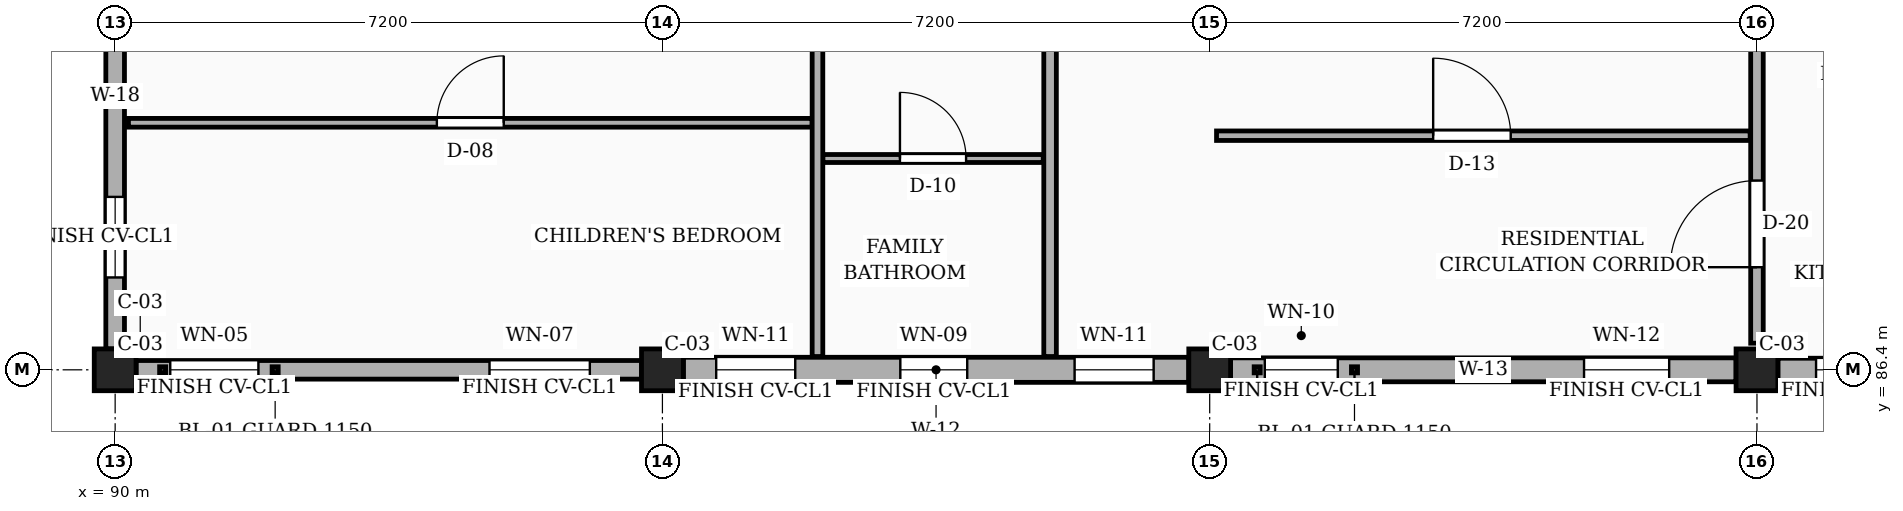
"""IFC4 building model, lengths in metres.
Left out: names, types, materials, properties, quantities, classifications, styles, units other than length and angle.
Written with IfcOpenShell. Run it as: python <this file> out.ifc"""

import sys

from ifc_helpers import new_model, si_unit, direction, frame, frame_2d, origin, origin_2d, place, context, subcontext, project, spatial, rectangle, extrude, element, fill, save


model = new_model("IFC4")
c1 = context("Model", 3, precision=1e-05, world=origin(), true_north=direction((0.0, 1.0)))
c2 = subcontext(c1, "Body", "Model", "MODEL_VIEW")
j1 = project(units=[si_unit("LENGTHUNIT", "METRE"), si_unit("PLANEANGLEUNIT", "RADIAN")], contexts=[c1])
p1 = place(None, origin())
s1 = spatial("IfcSite", under=j1, at=p1, CompositionType="ELEMENT")
p2 = place(p1, origin())
s2 = spatial("IfcBuilding", under=s1, at=p2, CompositionType="ELEMENT")
p3 = place(p2, frame((0.0, 0.0, 20.25)))
s3 = spatial("IfcBuildingStorey", under=s2, at=p3, CompositionType="ELEMENT", Elevation=20.25)
for number, where, z_axis, x_axis in (
    (1, (90.0, 86.4, 0.0), (0.0, 0.0, 1.0), (1.0, 0.0, 0.0)),
    (2, (97.2, 86.4, 0.0), (0.0, 0.0, 1.0), (1.0, 0.0, 0.0)),
    (3, (104.4, 86.4, 0.0), (0.0, 0.0, 1.0), (1.0, 0.0, 0.0)),
    (4, (111.6, 86.4, 0.0), (0.0, 0.0, 1.0), (1.0, 0.0, 0.0)),
):
    element("IfcColumn", number, at=place(p3, frame(where, z_axis=z_axis, x_axis=x_axis)), inside=s3, PredefinedType="COLUMN", context=c2, shape_type="SweptSolid", body=[
        extrude(rectangle(XDim=0.55, YDim=0.55, at=origin_2d()), origin(), (0.0, 0.0, 1.0), 3.15),
    ])
p4 = place(p3, frame((90.275, 86.4, 0.0), z_axis=(0.0, 0.0, 1.0), x_axis=(1.0, 0.0, 0.0)))
e5 = element("IfcWall", 5, at=p4, inside=s3, PredefinedType="SOLIDWALL", context=c2, shape_type="SweptSolid", body=[
    extrude(rectangle(XDim=6.65, YDim=0.245, at=frame_2d((3.325, 0.0))), origin(), (0.0, 0.0, 1.0), 2.46),
])
p5 = place(p4, frame((0.45, 0.0, 0.78)))
e6 = element("IfcOpeningElement", 6, at=p5, cuts=e5, PredefinedType="OPENING", context=c2, shape_type="SweptSolid", body=[
    extrude(rectangle(XDim=1.16, YDim=1.15, at=frame_2d((0.58, 0.575))), frame((0.0, 0.133, 0.0), z_axis=(0.0, -1.0, 0.0), x_axis=(1.0, 0.0, 0.0)), (0.0, 0.0, 1.0), 0.265),
])
p6 = place(p4, frame((4.65, 0.0, 0.78)))
e7 = element("IfcOpeningElement", 7, at=p6, cuts=e5, PredefinedType="OPENING", context=c2, shape_type="SweptSolid", body=[
    extrude(rectangle(XDim=1.32, YDim=1.15, at=frame_2d((0.66, 0.575))), frame((0.0, 0.133, 0.0), z_axis=(0.0, -1.0, 0.0), x_axis=(1.0, 0.0, 0.0)), (0.0, 0.0, 1.0), 0.265),
])
p7 = place(p3, frame((97.475, 86.4, 0.0), z_axis=(0.0, 0.0, 1.0), x_axis=(1.0, 0.0, 0.0)))
e8 = element("IfcWall", 8, at=p7, inside=s3, PredefinedType="SOLIDWALL", context=c2, shape_type="SweptSolid", body=[
    extrude(rectangle(XDim=6.65, YDim=0.33, at=frame_2d((3.325, 0.0))), origin(), (0.0, 0.0, 1.0), 2.46),
])
p8 = place(p7, frame((0.433, 0.0, 0.78)))
e9 = element("IfcOpeningElement", 9, at=p8, cuts=e8, PredefinedType="OPENING", context=c2, shape_type="SweptSolid", body=[
    extrude(rectangle(XDim=1.04, YDim=1.26, at=frame_2d((0.52, 0.63))), frame((0.0, 0.175, 0.0), z_axis=(0.0, -1.0, 0.0), x_axis=(1.0, 0.0, 0.0)), (0.0, 0.0, 1.0), 0.35),
])
p9 = place(p7, frame((2.855, 0.0, 0.78)))
e10 = element("IfcOpeningElement", 10, at=p9, cuts=e8, PredefinedType="OPENING", context=c2, shape_type="SweptSolid", body=[
    extrude(rectangle(XDim=0.88, YDim=1.26, at=frame_2d((0.44, 0.63))), frame((0.0, 0.175, 0.0), z_axis=(0.0, -1.0, 0.0), x_axis=(1.0, 0.0, 0.0)), (0.0, 0.0, 1.0), 0.35),
])
p10 = place(p7, frame((5.147, 0.0, 0.78)))
e11 = element("IfcOpeningElement", 11, at=p10, cuts=e8, PredefinedType="OPENING", context=c2, shape_type="SweptSolid", body=[
    extrude(rectangle(XDim=1.04, YDim=1.26, at=frame_2d((0.52, 0.63))), frame((0.0, 0.175, 0.0), z_axis=(0.0, -1.0, 0.0), x_axis=(1.0, 0.0, 0.0)), (0.0, 0.0, 1.0), 0.35),
])
p11 = place(p3, frame((104.675, 86.4, 0.0), z_axis=(0.0, 0.0, 1.0), x_axis=(1.0, 0.0, 0.0)))
e12 = element("IfcWall", 12, at=p11, inside=s3, PredefinedType="SOLIDWALL", context=c2, shape_type="SweptSolid", body=[
    extrude(rectangle(XDim=6.65, YDim=0.315, at=frame_2d((3.325, 0.0))), origin(), (0.0, 0.0, 1.0), 2.46),
])
p12 = place(p11, frame((0.45, 0.0, 0.78)))
e13 = element("IfcOpeningElement", 13, at=p12, cuts=e12, PredefinedType="OPENING", context=c2, shape_type="SweptSolid", body=[
    extrude(rectangle(XDim=0.96, YDim=1.26, at=frame_2d((0.48, 0.63))), frame((0.0, 0.167, 0.0), z_axis=(0.0, -1.0, 0.0), x_axis=(1.0, 0.0, 0.0)), (0.0, 0.0, 1.0), 0.335),
])
p13 = place(p11, frame((4.65, 0.0, 0.78)))
e14 = element("IfcOpeningElement", 14, at=p13, cuts=e12, PredefinedType="OPENING", context=c2, shape_type="SweptSolid", body=[
    extrude(rectangle(XDim=1.12, YDim=1.26, at=frame_2d((0.56, 0.63))), frame((0.0, 0.167, 0.0), z_axis=(0.0, -1.0, 0.0), x_axis=(1.0, 0.0, 0.0)), (0.0, 0.0, 1.0), 0.335),
])
p14 = place(p3, frame((111.875, 86.4, 0.0), z_axis=(0.0, 0.0, 1.0), x_axis=(1.0, 0.0, 0.0)))
e15 = element("IfcWall", 15, at=p14, inside=s3, PredefinedType="SOLIDWALL", context=c2, shape_type="SweptSolid", body=[
    extrude(rectangle(XDim=6.65, YDim=0.305, at=frame_2d((3.325, 0.0))), origin(), (0.0, 0.0, 1.0), 2.46),
])
p15 = place(p14, frame((0.502, 0.0, 0.78)))
e16 = element("IfcOpeningElement", 16, at=p15, cuts=e15, PredefinedType="OPENING", context=c2, shape_type="SweptSolid", body=[
    extrude(rectangle(XDim=1.12, YDim=1.26, at=frame_2d((0.56, 0.63))), frame((0.0, 0.163, 0.0), z_axis=(0.0, -1.0, 0.0), x_axis=(1.0, 0.0, 0.0)), (0.0, 0.0, 1.0), 0.325),
])
p16 = place(p14, frame((3.607, 0.0, 0.78)))
e17 = element("IfcOpeningElement", 17, at=p16, cuts=e15, PredefinedType="OPENING", context=c2, shape_type="SweptSolid", body=[
    extrude(rectangle(XDim=1.28, YDim=1.26, at=frame_2d((0.64, 0.63))), frame((0.0, 0.163, 0.0), z_axis=(0.0, -1.0, 0.0), x_axis=(1.0, 0.0, 0.0)), (0.0, 0.0, 1.0), 0.325),
])
p17 = place(p3, frame((90.0, 93.325, 0.0), z_axis=(0.0, 0.0, 1.0), x_axis=(0.0, -1.0, 0.0)))
e18 = element("IfcWall", 18, at=p17, inside=s3, PredefinedType="SOLIDWALL", context=c2, shape_type="SweptSolid", body=[
    extrude(rectangle(XDim=6.65, YDim=0.245, at=frame_2d((3.325, 0.0))), origin(), (0.0, 0.0, 1.0), 2.46),
])
p18 = place(p17, frame((0.45, 0.0, 0.78)))
e19 = element("IfcOpeningElement", 19, at=p18, cuts=e18, PredefinedType="OPENING", context=c2, shape_type="SweptSolid", body=[
    extrude(rectangle(XDim=0.9, YDim=1.36, at=frame_2d((0.45, 0.68))), frame((0.0, 0.133, 0.0), z_axis=(0.0, -1.0, 0.0), x_axis=(1.0, 0.0, 0.0)), (0.0, 0.0, 1.0), 0.265),
])
p19 = place(p17, frame((4.65, 0.0, 0.78)))
e20 = element("IfcOpeningElement", 20, at=p19, cuts=e18, PredefinedType="OPENING", context=c2, shape_type="SweptSolid", body=[
    extrude(rectangle(XDim=1.06, YDim=1.36, at=frame_2d((0.53, 0.68))), frame((0.0, 0.133, 0.0), z_axis=(0.0, -1.0, 0.0), x_axis=(1.0, 0.0, 0.0)), (0.0, 0.0, 1.0), 0.265),
])
p20 = place(p3, frame((102.3, 86.575, 0.0), z_axis=(0.0, 0.0, 1.0), x_axis=(0.0, 1.0, 0.0)))
e21 = element("IfcWall", 21, at=p20, inside=s3, PredefinedType="PARTITIONING", context=c2, shape_type="SweptSolid", body=[
    extrude(rectangle(XDim=7.005, YDim=0.165, at=frame_2d((3.502, 0.0))), origin(), (0.0, 0.0, 1.0), 2.325),
])
p21 = place(p20, frame((4.625, 0.0, 0.0)))
e22 = element("IfcOpeningElement", 22, at=p21, cuts=e21, PredefinedType="OPENING", context=c2, shape_type="SweptSolid", body=[
    extrude(rectangle(XDim=0.94, YDim=2.12, at=frame_2d((0.47, 1.06))), frame((0.0, 0.093, 0.0), z_axis=(0.0, -1.0, 0.0), x_axis=(1.0, 0.0, 0.0)), (0.0, 0.0, 1.0), 0.185),
])
p22 = place(p3, frame((111.6, 86.75, 0.0), z_axis=(0.0, 0.0, 1.0), x_axis=(0.0, 1.0, 0.0)))
e23 = element("IfcWall", 23, at=p22, inside=s3, PredefinedType="PARTITIONING", context=c2, shape_type="SweptSolid", body=[
    extrude(rectangle(XDim=6.5, YDim=0.165, at=frame_2d((3.25, 0.0))), origin(), (0.0, 0.0, 1.0), 2.325),
])
p23 = place(p22, frame((1.0, 0.0, 0.0)))
e24 = element("IfcOpeningElement", 24, at=p23, cuts=e23, PredefinedType="OPENING", context=c2, shape_type="SweptSolid", body=[
    extrude(rectangle(XDim=1.14, YDim=2.18, at=frame_2d((0.57, 1.09))), frame((0.0, 0.093, 0.0), z_axis=(0.0, -1.0, 0.0), x_axis=(1.0, 0.0, 0.0)), (0.0, 0.0, 1.0), 0.185),
])
p24 = place(p3, frame((104.49, 89.48, 0.0), z_axis=(0.0, 0.0, 1.0), x_axis=(1.0, 0.0, 0.0)))
e25 = element("IfcWall", 25, at=p24, inside=s3, PredefinedType="PARTITIONING", context=c2, shape_type="SweptSolid", body=[
    extrude(rectangle(XDim=7.02, YDim=0.125, at=frame_2d((3.51, 0.0))), origin(), (0.0, 0.0, 1.0), 2.325),
])
p25 = place(p24, frame((2.85, 0.0, 0.0)))
e26 = element("IfcOpeningElement", 26, at=p25, cuts=e25, PredefinedType="OPENING", context=c2, shape_type="SweptSolid", body=[
    extrude(rectangle(XDim=1.02, YDim=2.15, at=frame_2d((0.51, 1.075))), frame((0.0, 0.073, 0.0), z_axis=(0.0, -1.0, 0.0), x_axis=(1.0, 0.0, 0.0)), (0.0, 0.0, 1.0), 0.145),
])
p26 = place(p3, frame((90.175, 89.65, 0.0), z_axis=(0.0, 0.0, 1.0), x_axis=(1.0, 0.0, 0.0)))
e27 = element("IfcWall", 27, at=p26, inside=s3, PredefinedType="PARTITIONING", context=c2, shape_type="SweptSolid", body=[
    extrude(rectangle(XDim=8.995, YDim=0.115, at=frame_2d((4.498, 0.0))), origin(), (0.0, 0.0, 1.0), 2.325),
])
p27 = place(p26, frame((4.058, 0.0, 0.0)))
e28 = element("IfcOpeningElement", 28, at=p27, cuts=e27, PredefinedType="OPENING", context=c2, shape_type="SweptSolid", body=[
    extrude(rectangle(XDim=0.88, YDim=2.08, at=frame_2d((0.44, 1.04))), frame((0.0, 0.067, 0.0), z_axis=(0.0, -1.0, 0.0), x_axis=(1.0, 0.0, 0.0)), (0.0, 0.0, 1.0), 0.135),
])
p28 = place(p3, frame((99.31, 89.18, 0.0), z_axis=(0.0, 0.0, 1.0), x_axis=(1.0, 0.0, 0.0)))
e29 = element("IfcWall", 29, at=p28, inside=s3, PredefinedType="PARTITIONING", context=c2, shape_type="SweptSolid", body=[
    extrude(rectangle(XDim=2.9, YDim=0.105, at=frame_2d((1.45, 0.0))), origin(), (0.0, 0.0, 1.0), 2.325),
])
p29 = place(p28, frame((1.015, 0.0, 0.0)))
e30 = element("IfcOpeningElement", 30, at=p29, cuts=e29, PredefinedType="OPENING", context=c2, shape_type="SweptSolid", body=[
    extrude(rectangle(XDim=0.87, YDim=2.05, at=frame_2d((0.435, 1.025))), frame((0.0, 0.062, 0.0), z_axis=(0.0, -1.0, 0.0), x_axis=(1.0, 0.0, 0.0)), (0.0, 0.0, 1.0), 0.125),
])
p30 = place(p3, frame((99.24, 86.575, 0.0), z_axis=(0.0, 0.0, 1.0), x_axis=(0.0, 1.0, 0.0)))
e31 = element("IfcWall", 31, at=p30, inside=s3, PredefinedType="PARTITIONING", context=c2, shape_type="SweptSolid", body=[
    extrude(rectangle(XDim=6.885, YDim=0.14, at=frame_2d((3.442, 0.0))), origin(), (0.0, 0.0, 1.0), 2.325),
])
p31 = place(p30, frame((4.625, 0.0, 0.0)))
e32 = element("IfcOpeningElement", 32, at=p31, cuts=e31, PredefinedType="OPENING", context=c2, shape_type="SweptSolid", body=[
    extrude(rectangle(XDim=0.92, YDim=2.1, at=frame_2d((0.46, 1.05))), frame((0.0, 0.08, 0.0), z_axis=(0.0, -1.0, 0.0), x_axis=(1.0, 0.0, 0.0)), (0.0, 0.0, 1.0), 0.16),
])
p32 = place(p5, origin())
e33 = element("IfcWindow", 33, at=p32, inside=s3, PartitioningType="SINGLE_PANEL", PredefinedType="WINDOW", context=c2, shape_type="SweptSolid", body=[
    extrude(rectangle(XDim=1.16, YDim=1.15, at=frame_2d((0.58, 0.575))), frame((0.0, 0.03, 0.0), z_axis=(0.0, -1.0, 0.0), x_axis=(1.0, 0.0, 0.0)), (0.0, 0.0, 1.0), 0.06),
])
fill(e6, e33)
p33 = place(p6, origin())
e34 = element("IfcWindow", 34, at=p33, inside=s3, PartitioningType="SINGLE_PANEL", PredefinedType="WINDOW", context=c2, shape_type="SweptSolid", body=[
    extrude(rectangle(XDim=1.32, YDim=1.15, at=frame_2d((0.66, 0.575))), frame((0.0, 0.03, 0.0), z_axis=(0.0, -1.0, 0.0), x_axis=(1.0, 0.0, 0.0)), (0.0, 0.0, 1.0), 0.06),
])
fill(e7, e34)
p34 = place(p8, origin())
e35 = element("IfcWindow", 35, at=p34, inside=s3, PartitioningType="SINGLE_PANEL", PredefinedType="WINDOW", context=c2, shape_type="SweptSolid", body=[
    extrude(rectangle(XDim=1.04, YDim=1.26, at=frame_2d((0.52, 0.63))), frame((0.0, 0.03, 0.0), z_axis=(0.0, -1.0, 0.0), x_axis=(1.0, 0.0, 0.0)), (0.0, 0.0, 1.0), 0.06),
])
fill(e9, e35)
p35 = place(p9, origin())
e36 = element("IfcWindow", 36, at=p35, inside=s3, PartitioningType="SINGLE_PANEL", PredefinedType="WINDOW", context=c2, shape_type="SweptSolid", body=[
    extrude(rectangle(XDim=0.88, YDim=1.26, at=frame_2d((0.44, 0.63))), frame((0.0, 0.03, 0.0), z_axis=(0.0, -1.0, 0.0), x_axis=(1.0, 0.0, 0.0)), (0.0, 0.0, 1.0), 0.06),
])
fill(e10, e36)
p36 = place(p10, origin())
e37 = element("IfcWindow", 37, at=p36, inside=s3, PartitioningType="SINGLE_PANEL", PredefinedType="WINDOW", context=c2, shape_type="SweptSolid", body=[
    extrude(rectangle(XDim=1.04, YDim=1.26, at=frame_2d((0.52, 0.63))), frame((0.0, 0.03, 0.0), z_axis=(0.0, -1.0, 0.0), x_axis=(1.0, 0.0, 0.0)), (0.0, 0.0, 1.0), 0.06),
])
fill(e11, e37)
p37 = place(p12, origin())
e38 = element("IfcWindow", 38, at=p37, inside=s3, PartitioningType="SINGLE_PANEL", PredefinedType="WINDOW", context=c2, shape_type="SweptSolid", body=[
    extrude(rectangle(XDim=0.96, YDim=1.26, at=frame_2d((0.48, 0.63))), frame((0.0, 0.03, 0.0), z_axis=(0.0, -1.0, 0.0), x_axis=(1.0, 0.0, 0.0)), (0.0, 0.0, 1.0), 0.06),
])
fill(e13, e38)
p38 = place(p13, origin())
e39 = element("IfcWindow", 39, at=p38, inside=s3, PartitioningType="SINGLE_PANEL", PredefinedType="WINDOW", context=c2, shape_type="SweptSolid", body=[
    extrude(rectangle(XDim=1.12, YDim=1.26, at=frame_2d((0.56, 0.63))), frame((0.0, 0.03, 0.0), z_axis=(0.0, -1.0, 0.0), x_axis=(1.0, 0.0, 0.0)), (0.0, 0.0, 1.0), 0.06),
])
fill(e14, e39)
p39 = place(p15, origin())
e40 = element("IfcWindow", 40, at=p39, inside=s3, PartitioningType="SINGLE_PANEL", PredefinedType="WINDOW", context=c2, shape_type="SweptSolid", body=[
    extrude(rectangle(XDim=1.12, YDim=1.26, at=frame_2d((0.56, 0.63))), frame((0.0, 0.03, 0.0), z_axis=(0.0, -1.0, 0.0), x_axis=(1.0, 0.0, 0.0)), (0.0, 0.0, 1.0), 0.06),
])
fill(e16, e40)
p40 = place(p19, origin())
e41 = element("IfcWindow", 41, at=p40, inside=s3, PartitioningType="SINGLE_PANEL", PredefinedType="WINDOW", context=c2, shape_type="SweptSolid", body=[
    extrude(rectangle(XDim=1.06, YDim=1.36, at=frame_2d((0.53, 0.68))), frame((0.0, 0.03, 0.0), z_axis=(0.0, -1.0, 0.0), x_axis=(1.0, 0.0, 0.0)), (0.0, 0.0, 1.0), 0.06),
])
fill(e20, e41)
p41 = place(p23, origin())
e42 = element("IfcDoor", 42, at=p41, inside=s3, OperationType="SINGLE_SWING_LEFT", PredefinedType="DOOR", context=c2, shape_type="SweptSolid", body=[
    extrude(rectangle(XDim=1.14, YDim=2.18, at=frame_2d((0.57, 1.09))), frame((0.0, 0.025, 0.0), z_axis=(0.0, -1.0, 0.0), x_axis=(1.0, 0.0, 0.0)), (0.0, 0.0, 1.0), 0.05),
])
fill(e24, e42)
p42 = place(p25, origin())
e43 = element("IfcDoor", 43, at=p42, inside=s3, OperationType="SINGLE_SWING_LEFT", PredefinedType="DOOR", context=c2, shape_type="SweptSolid", body=[
    extrude(rectangle(XDim=1.02, YDim=2.15, at=frame_2d((0.51, 1.075))), frame((0.0, 0.025, 0.0), z_axis=(0.0, -1.0, 0.0), x_axis=(1.0, 0.0, 0.0)), (0.0, 0.0, 1.0), 0.05),
])
fill(e26, e43)
p43 = place(p27, origin())
e44 = element("IfcDoor", 44, at=p43, inside=s3, OperationType="SINGLE_SWING_RIGHT", PredefinedType="DOOR", context=c2, shape_type="SweptSolid", body=[
    extrude(rectangle(XDim=0.88, YDim=2.08, at=frame_2d((0.44, 1.04))), frame((0.0, 0.025, 0.0), z_axis=(0.0, -1.0, 0.0), x_axis=(1.0, 0.0, 0.0)), (0.0, 0.0, 1.0), 0.05),
])
fill(e28, e44)
p44 = place(p29, origin())
e45 = element("IfcDoor", 45, at=p44, inside=s3, OperationType="SINGLE_SWING_LEFT", PredefinedType="DOOR", context=c2, shape_type="SweptSolid", body=[
    extrude(rectangle(XDim=0.87, YDim=2.05, at=frame_2d((0.435, 1.025))), frame((0.0, 0.025, 0.0), z_axis=(0.0, -1.0, 0.0), x_axis=(1.0, 0.0, 0.0)), (0.0, 0.0, 1.0), 0.05),
])
fill(e30, e45)
save(model, sys.argv[1])
